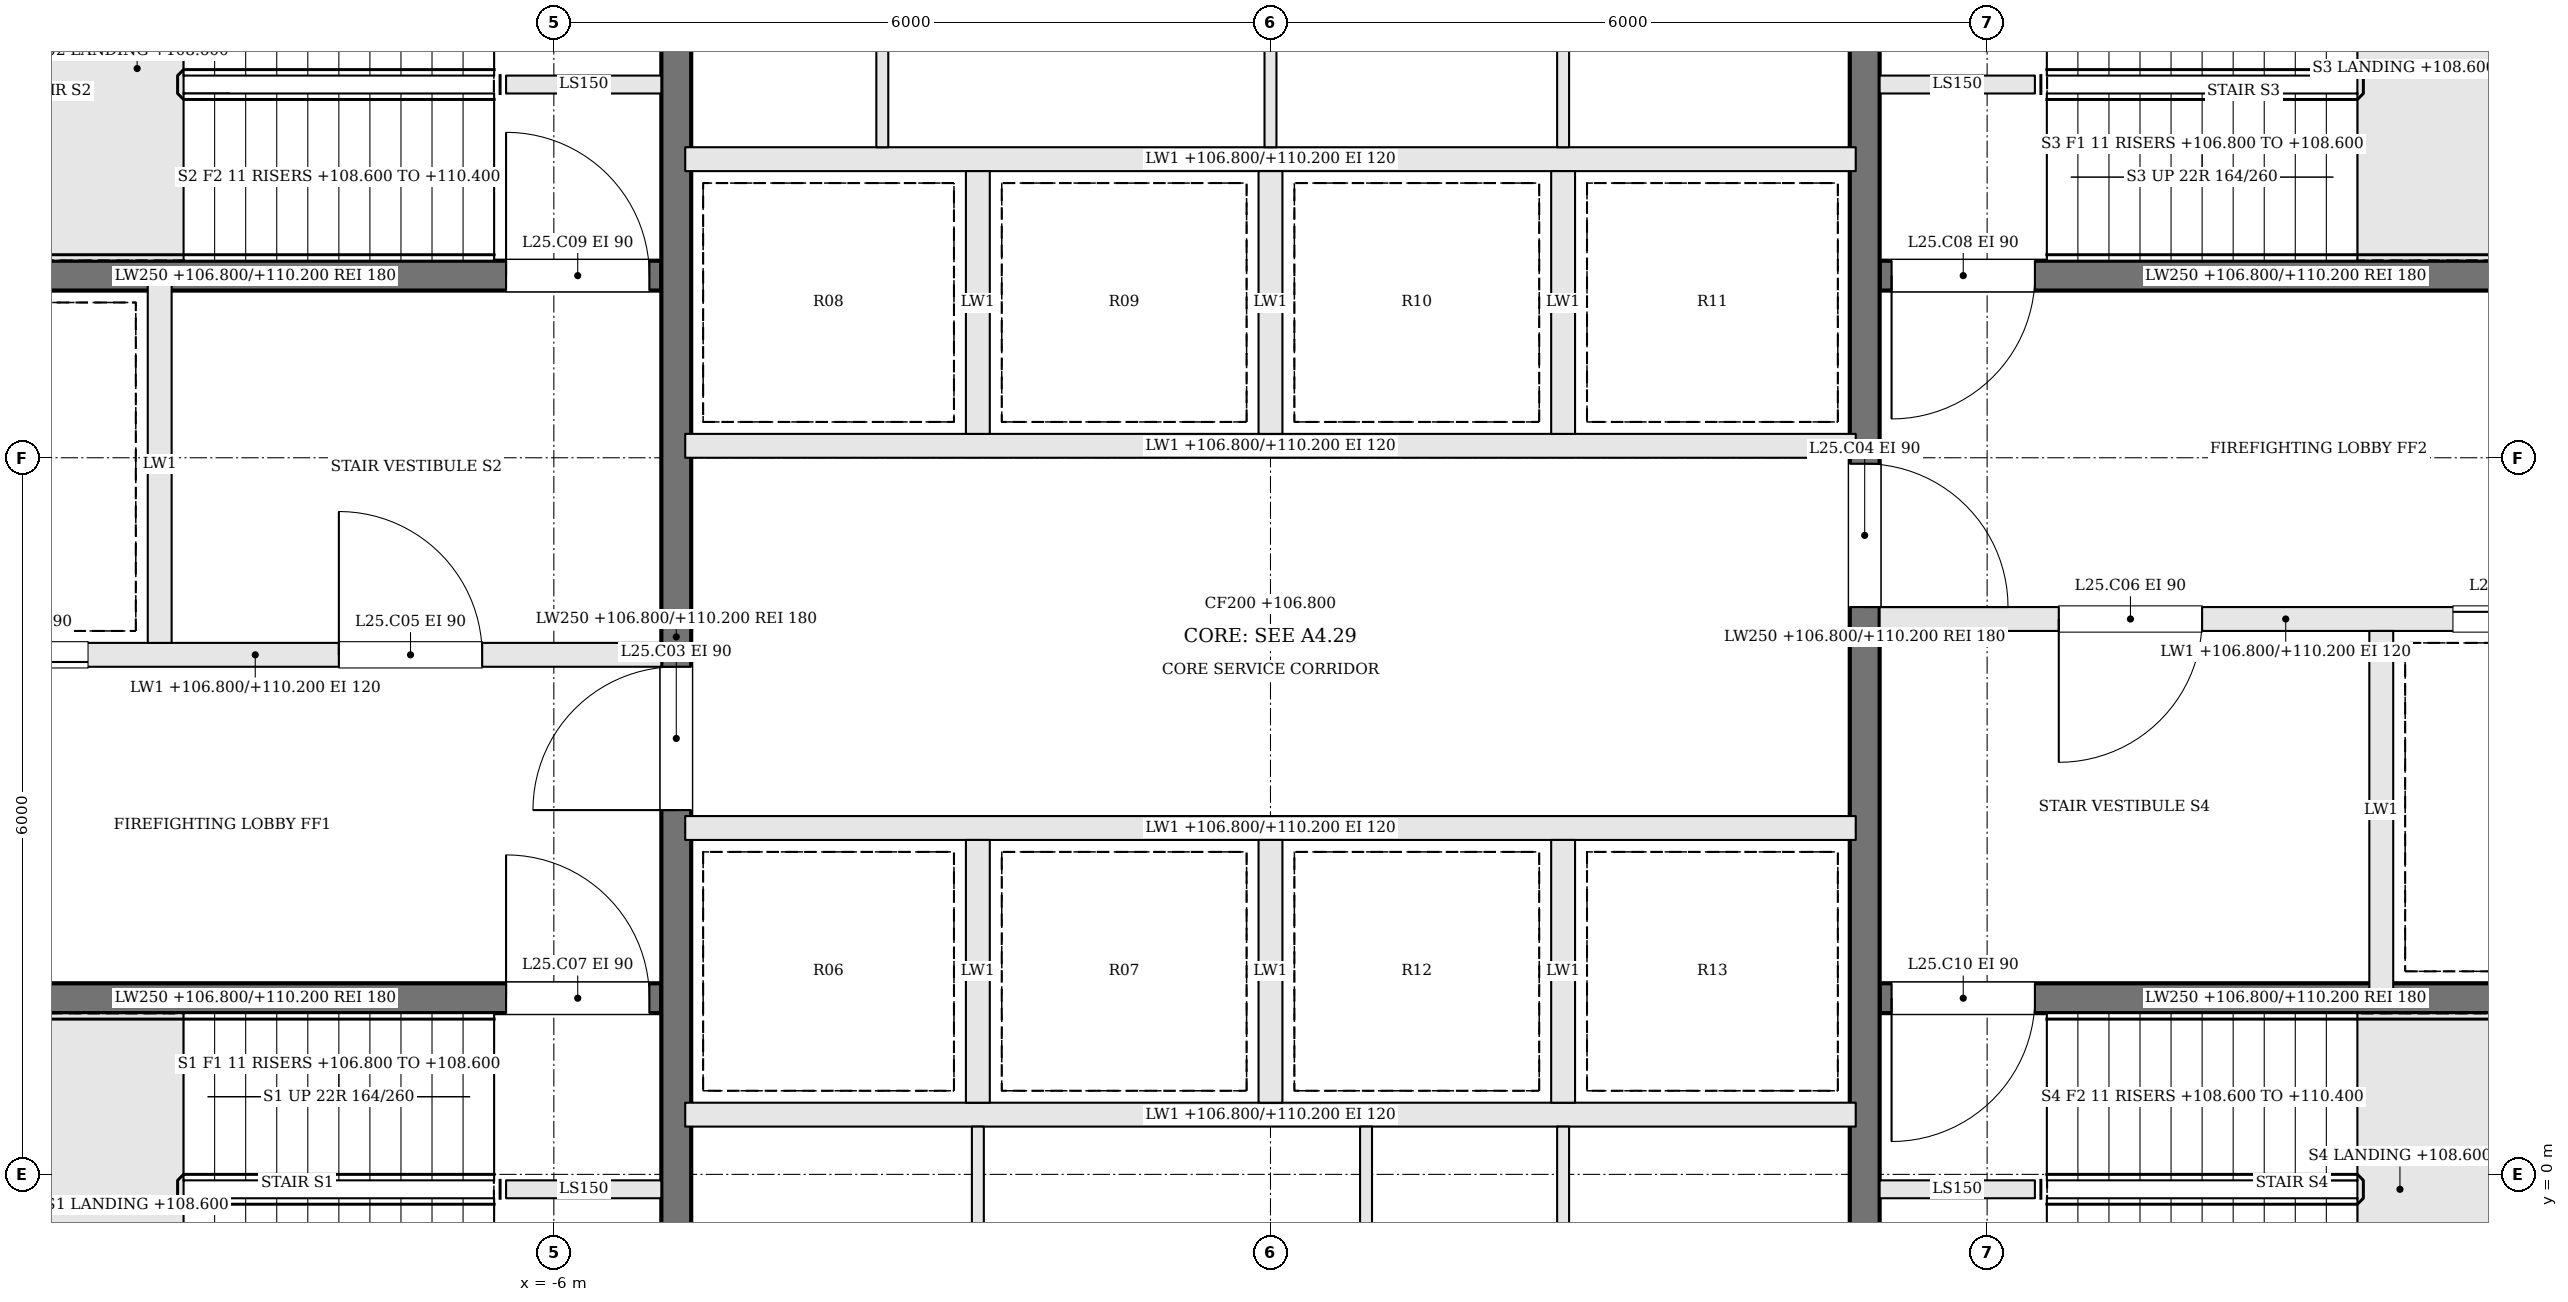
"""IFC4 building model, lengths in metres.
Left out: names, types, materials, properties, quantities, classifications, styles, units other than length and angle.
Written with IfcOpenShell. Run it as: python <this file> out.ifc"""

import sys

from ifc_helpers import new_model, si_unit, direction, frame, frame_2d, origin, place, context, subcontext, project, spatial, rectangle, extrude, element, fill, save


model = new_model("IFC4")
c1 = context("Model", 3, precision=1e-05, world=origin(), true_north=direction((0.0, 1.0)))
c2 = subcontext(c1, "Body", "Model", "MODEL_VIEW")
j1 = project(units=[si_unit("LENGTHUNIT", "METRE"), si_unit("PLANEANGLEUNIT", "RADIAN")], contexts=[c1])
p1 = place(None, origin())
s1 = spatial("IfcSite", under=j1, at=p1, CompositionType="ELEMENT")
p2 = place(p1, origin())
s2 = spatial("IfcBuilding", under=s1, at=p2, CompositionType="ELEMENT")
p3 = place(p2, frame((0.0, 0.0, 106.8)))
s3 = spatial("IfcBuildingStorey", under=s2, at=p3, CompositionType="ELEMENT", Elevation=106.8)
for number, where, z_axis, x_axis in (
    (1, (-6.4, -0.125, 0.0), (0.0, 0.0, 1.0), (1.0, 0.0, 0.0)),
    (2, (6.4, 9.125, 0.0), (0.0, 0.0, 1.0), (-1.0, 0.0, 0.0)),
    (3, (-6.4, 9.125, 0.0), (0.0, 0.0, 1.0), (1.0, 0.0, 0.0)),
    (4, (6.4, -0.125, 0.0), (0.0, 0.0, 1.0), (-1.0, 0.0, 0.0)),
):
    element("IfcWall", number, at=place(p3, frame(where, z_axis=z_axis, x_axis=x_axis)), inside=s3, PredefinedType="SOLIDWALL", context=c2, shape_type="SweptSolid", body=[
        extrude(rectangle(XDim=1.3, YDim=0.15, at=frame_2d((0.65, 0.0))), origin(), (0.0, 0.0, 1.0), 3.4),
    ])
p4 = place(p3, frame((-11.9, 1.475, 0.0), z_axis=(0.0, 0.0, 1.0), x_axis=(1.0, 0.0, 0.0)))
e5 = element("IfcWall", 5, at=p4, inside=s3, PredefinedType="SOLIDWALL", context=c2, shape_type="SweptSolid", body=[
    extrude(rectangle(XDim=6.8, YDim=0.25, at=frame_2d((3.4, 0.0))), origin(), (0.0, 0.0, 1.0), 3.4),
])
p5 = place(p4, frame((5.5, 0.0, 0.0)))
e6 = element("IfcOpeningElement", 6, at=p5, cuts=e5, PredefinedType="OPENING", context=c2, shape_type="SweptSolid", body=[
    extrude(rectangle(XDim=1.2, YDim=2.1, at=frame_2d((0.6, 1.05))), frame((0.0, 0.135, 0.0), z_axis=(0.0, -1.0, 0.0), x_axis=(1.0, 0.0, 0.0)), (0.0, 0.0, 1.0), 0.27),
])
p6 = place(p3, frame((11.9, 7.525, 0.0), z_axis=(0.0, 0.0, 1.0), x_axis=(-1.0, 0.0, 0.0)))
e7 = element("IfcWall", 7, at=p6, inside=s3, PredefinedType="SOLIDWALL", context=c2, shape_type="SweptSolid", body=[
    extrude(rectangle(XDim=6.8, YDim=0.25, at=frame_2d((3.4, 0.0))), origin(), (0.0, 0.0, 1.0), 3.4),
])
p7 = place(p6, frame((5.5, 0.0, 0.0)))
e8 = element("IfcOpeningElement", 8, at=p7, cuts=e7, PredefinedType="OPENING", context=c2, shape_type="SweptSolid", body=[
    extrude(rectangle(XDim=1.2, YDim=2.1, at=frame_2d((0.6, 1.05))), frame((0.0, 0.135, 0.0), z_axis=(0.0, -1.0, 0.0), x_axis=(1.0, 0.0, 0.0)), (0.0, 0.0, 1.0), 0.27),
])
p8 = place(p3, frame((-11.9, 4.35, 0.0), z_axis=(0.0, 0.0, 1.0), x_axis=(1.0, 0.0, 0.0)))
e9 = element("IfcWall", 9, at=p8, inside=s3, PredefinedType="SOLIDWALL", context=c2, shape_type="SweptSolid", body=[
    extrude(rectangle(XDim=6.8, YDim=0.2, at=frame_2d((3.4, 0.0))), origin(), (0.0, 0.0, 1.0), 3.4),
])
p9 = place(p8, frame((4.1, 0.0, 0.0)))
e10 = element("IfcOpeningElement", 10, at=p9, cuts=e9, PredefinedType="OPENING", context=c2, shape_type="SweptSolid", body=[
    extrude(rectangle(XDim=1.2, YDim=2.1, at=frame_2d((0.6, 1.05))), frame((0.0, 0.11, 0.0), z_axis=(0.0, -1.0, 0.0), x_axis=(1.0, 0.0, 0.0)), (0.0, 0.0, 1.0), 0.22),
])
p10 = place(p8, frame((0.8, 0.0, 0.0)))
e11 = element("IfcOpeningElement", 11, at=p10, cuts=e9, PredefinedType="OPENING", context=c2, shape_type="SweptSolid", body=[
    extrude(rectangle(XDim=1.2, YDim=2.1, at=frame_2d((0.6, 1.05))), frame((0.0, 0.11, 0.0), z_axis=(0.0, -1.0, 0.0), x_axis=(1.0, 0.0, 0.0)), (0.0, 0.0, 1.0), 0.22),
])
p11 = place(p3, frame((11.9, 4.65, 0.0), z_axis=(0.0, 0.0, 1.0), x_axis=(-1.0, 0.0, 0.0)))
e12 = element("IfcWall", 12, at=p11, inside=s3, PredefinedType="SOLIDWALL", context=c2, shape_type="SweptSolid", body=[
    extrude(rectangle(XDim=6.8, YDim=0.2, at=frame_2d((3.4, 0.0))), origin(), (0.0, 0.0, 1.0), 3.4),
])
p12 = place(p11, frame((4.1, 0.0, 0.0)))
e13 = element("IfcOpeningElement", 13, at=p12, cuts=e12, PredefinedType="OPENING", context=c2, shape_type="SweptSolid", body=[
    extrude(rectangle(XDim=1.2, YDim=2.1, at=frame_2d((0.6, 1.05))), frame((0.0, 0.11, 0.0), z_axis=(0.0, -1.0, 0.0), x_axis=(1.0, 0.0, 0.0)), (0.0, 0.0, 1.0), 0.22),
])
p13 = place(p11, frame((0.8, 0.0, 0.0)))
e14 = element("IfcOpeningElement", 14, at=p13, cuts=e12, PredefinedType="OPENING", context=c2, shape_type="SweptSolid", body=[
    extrude(rectangle(XDim=1.2, YDim=2.1, at=frame_2d((0.6, 1.05))), frame((0.0, 0.11, 0.0), z_axis=(0.0, -1.0, 0.0), x_axis=(1.0, 0.0, 0.0)), (0.0, 0.0, 1.0), 0.22),
])
p14 = place(p3, frame((-11.9, 7.525, 0.0), z_axis=(0.0, 0.0, 1.0), x_axis=(1.0, 0.0, 0.0)))
e15 = element("IfcWall", 15, at=p14, inside=s3, PredefinedType="SOLIDWALL", context=c2, shape_type="SweptSolid", body=[
    extrude(rectangle(XDim=6.8, YDim=0.25, at=frame_2d((3.4, 0.0))), origin(), (0.0, 0.0, 1.0), 3.4),
])
p15 = place(p14, frame((5.5, 0.0, 0.0)))
e16 = element("IfcOpeningElement", 16, at=p15, cuts=e15, PredefinedType="OPENING", context=c2, shape_type="SweptSolid", body=[
    extrude(rectangle(XDim=1.2, YDim=2.1, at=frame_2d((0.6, 1.05))), frame((0.0, 0.135, 0.0), z_axis=(0.0, -1.0, 0.0), x_axis=(1.0, 0.0, 0.0)), (0.0, 0.0, 1.0), 0.27),
])
p16 = place(p3, frame((11.9, 1.475, 0.0), z_axis=(0.0, 0.0, 1.0), x_axis=(-1.0, 0.0, 0.0)))
e17 = element("IfcWall", 17, at=p16, inside=s3, PredefinedType="SOLIDWALL", context=c2, shape_type="SweptSolid", body=[
    extrude(rectangle(XDim=6.8, YDim=0.25, at=frame_2d((3.4, 0.0))), origin(), (0.0, 0.0, 1.0), 3.4),
])
p17 = place(p16, frame((5.5, 0.0, 0.0)))
e18 = element("IfcOpeningElement", 18, at=p17, cuts=e17, PredefinedType="OPENING", context=c2, shape_type="SweptSolid", body=[
    extrude(rectangle(XDim=1.2, YDim=2.1, at=frame_2d((0.6, 1.05))), frame((0.0, 0.135, 0.0), z_axis=(0.0, -1.0, 0.0), x_axis=(1.0, 0.0, 0.0)), (0.0, 0.0, 1.0), 0.27),
])
for number, where, z_axis, x_axis in (
    (19, (-9.3, 4.45, 0.0), (0.0, 0.0, 1.0), (0.0, 1.0, 0.0)),
    (20, (9.3, 4.55, 0.0), (0.0, 0.0, 1.0), (0.0, -1.0, 0.0)),
):
    element("IfcWall", number, at=place(p3, frame(where, z_axis=z_axis, x_axis=x_axis)), inside=s3, PredefinedType="SOLIDWALL", context=c2, shape_type="SweptSolid", body=[
        extrude(rectangle(XDim=3.0, YDim=0.2, at=frame_2d((1.5, 0.0))), origin(), (0.0, 0.0, 1.0), 3.4),
    ])
p18 = place(p3, frame((-4.975, -1.9, 0.0), z_axis=(0.0, 0.0, 1.0), x_axis=(0.0, 1.0, 0.0)))
e21 = element("IfcWall", 21, at=p18, inside=s3, PredefinedType="SOLIDWALL", context=c2, shape_type="SweptSolid", body=[
    extrude(rectangle(XDim=12.8, YDim=0.25, at=frame_2d((6.4, 0.0))), origin(), (0.0, 0.0, 1.0), 3.4),
])
p19 = place(p18, frame((4.95, 0.0, 0.0)))
e22 = element("IfcOpeningElement", 22, at=p19, cuts=e21, PredefinedType="OPENING", context=c2, shape_type="SweptSolid", body=[
    extrude(rectangle(XDim=1.2, YDim=2.1, at=frame_2d((0.6, 1.05))), frame((0.0, 0.135, 0.0), z_axis=(0.0, -1.0, 0.0), x_axis=(1.0, 0.0, 0.0)), (0.0, 0.0, 1.0), 0.27),
])
p20 = place(p3, frame((4.975, 10.9, 0.0), z_axis=(0.0, 0.0, 1.0), x_axis=(0.0, -1.0, 0.0)))
e23 = element("IfcWall", 23, at=p20, inside=s3, PredefinedType="SOLIDWALL", context=c2, shape_type="SweptSolid", body=[
    extrude(rectangle(XDim=12.8, YDim=0.25, at=frame_2d((6.4, 0.0))), origin(), (0.0, 0.0, 1.0), 3.4),
])
p21 = place(p20, frame((4.95, 0.0, 0.0)))
e24 = element("IfcOpeningElement", 24, at=p21, cuts=e23, PredefinedType="OPENING", context=c2, shape_type="SweptSolid", body=[
    extrude(rectangle(XDim=1.2, YDim=2.1, at=frame_2d((0.6, 1.05))), frame((0.0, 0.135, 0.0), z_axis=(0.0, -1.0, 0.0), x_axis=(1.0, 0.0, 0.0)), (0.0, 0.0, 1.0), 0.27),
])
for number, where, z_axis, x_axis in (
    (25, (-4.9, 0.5, 0.0), (0.0, 0.0, 1.0), (1.0, 0.0, 0.0)),
    (26, (-4.9, 2.9, 0.0), (0.0, 0.0, 1.0), (1.0, 0.0, 0.0)),
    (27, (-4.9, 6.1, 0.0), (0.0, 0.0, 1.0), (1.0, 0.0, 0.0)),
    (28, (-4.9, 8.5, 0.0), (0.0, 0.0, 1.0), (1.0, 0.0, 0.0)),
):
    element("IfcWall", number, at=place(p3, frame(where, z_axis=z_axis, x_axis=x_axis)), inside=s3, PredefinedType="SOLIDWALL", context=c2, shape_type="SweptSolid", body=[
        extrude(rectangle(XDim=9.8, YDim=0.2, at=frame_2d((4.9, 0.0))), origin(), (0.0, 0.0, 1.0), 3.4),
    ])
for number, where, z_axis, x_axis in (
    (29, (-2.45, 0.6, 0.0), (0.0, 0.0, 1.0), (0.0, 1.0, 0.0)),
    (30, (0.0, 0.6, 0.0), (0.0, 0.0, 1.0), (0.0, 1.0, 0.0)),
    (31, (2.45, 0.6, 0.0), (0.0, 0.0, 1.0), (0.0, 1.0, 0.0)),
    (32, (-2.45, 6.2, 0.0), (0.0, 0.0, 1.0), (0.0, 1.0, 0.0)),
    (33, (0.0, 6.2, 0.0), (0.0, 0.0, 1.0), (0.0, 1.0, 0.0)),
    (34, (2.45, 6.2, 0.0), (0.0, 0.0, 1.0), (0.0, 1.0, 0.0)),
):
    element("IfcWall", number, at=place(p3, frame(where, z_axis=z_axis, x_axis=x_axis)), inside=s3, PredefinedType="SOLIDWALL", context=c2, shape_type="SweptSolid", body=[
        extrude(rectangle(XDim=2.2, YDim=0.2, at=frame_2d((1.1, 0.0))), origin(), (0.0, 0.0, 1.0), 3.4),
    ])
for number, where, z_axis, x_axis in (
    (35, (-2.45, -1.9, 0.0), (0.0, 0.0, 1.0), (0.0, 1.0, 0.0)),
    (36, (0.8, -1.9, 0.0), (0.0, 0.0, 1.0), (0.0, 1.0, 0.0)),
    (37, (2.45, -1.9, 0.0), (0.0, 0.0, 1.0), (0.0, 1.0, 0.0)),
    (38, (-3.25, 8.6, 0.0), (0.0, 0.0, 1.0), (0.0, 1.0, 0.0)),
    (39, (0.0, 8.6, 0.0), (0.0, 0.0, 1.0), (0.0, 1.0, 0.0)),
    (40, (2.45, 8.6, 0.0), (0.0, 0.0, 1.0), (0.0, 1.0, 0.0)),
):
    element("IfcWall", number, at=place(p3, frame(where, z_axis=z_axis, x_axis=x_axis)), inside=s3, PredefinedType="PARTITIONING", context=c2, shape_type="SweptSolid", body=[
        extrude(rectangle(XDim=2.3, YDim=0.1, at=frame_2d((1.15, 0.0))), origin(), (0.0, 0.0, 1.0), 3.4),
    ])
p22 = place(p19, origin())
e41 = element("IfcDoor", 41, at=p22, inside=s3, OperationType="SINGLE_SWING_LEFT", PredefinedType="DOOR", context=c2, shape_type="SweptSolid", body=[
    extrude(rectangle(XDim=1.2, YDim=2.1, at=frame_2d((0.6, 1.05))), frame((0.0, 0.025, 0.0), z_axis=(0.0, -1.0, 0.0), x_axis=(1.0, 0.0, 0.0)), (0.0, 0.0, 1.0), 0.05),
])
fill(e22, e41)
p23 = place(p21, origin())
e42 = element("IfcDoor", 42, at=p23, inside=s3, OperationType="SINGLE_SWING_RIGHT", PredefinedType="DOOR", context=c2, shape_type="SweptSolid", body=[
    extrude(rectangle(XDim=1.2, YDim=2.1, at=frame_2d((0.6, 1.05))), frame((0.0, 0.025, 0.0), z_axis=(0.0, -1.0, 0.0), x_axis=(1.0, 0.0, 0.0)), (0.0, 0.0, 1.0), 0.05),
])
fill(e24, e42)
p24 = place(p9, origin())
e43 = element("IfcDoor", 43, at=p24, inside=s3, OperationType="SINGLE_SWING_LEFT", PredefinedType="DOOR", context=c2, shape_type="SweptSolid", body=[
    extrude(rectangle(XDim=1.2, YDim=2.1, at=frame_2d((0.6, 1.05))), frame((0.0, 0.025, 0.0), z_axis=(0.0, -1.0, 0.0), x_axis=(1.0, 0.0, 0.0)), (0.0, 0.0, 1.0), 0.05),
])
fill(e10, e43)
p25 = place(p12, origin())
e44 = element("IfcDoor", 44, at=p25, inside=s3, OperationType="SINGLE_SWING_RIGHT", PredefinedType="DOOR", context=c2, shape_type="SweptSolid", body=[
    extrude(rectangle(XDim=1.2, YDim=2.1, at=frame_2d((0.6, 1.05))), frame((0.0, 0.025, 0.0), z_axis=(0.0, -1.0, 0.0), x_axis=(1.0, 0.0, 0.0)), (0.0, 0.0, 1.0), 0.05),
])
fill(e13, e44)
p26 = place(p5, origin())
e45 = element("IfcDoor", 45, at=p26, inside=s3, OperationType="SINGLE_SWING_LEFT", PredefinedType="DOOR", context=c2, shape_type="SweptSolid", body=[
    extrude(rectangle(XDim=1.2, YDim=2.1, at=frame_2d((0.6, 1.05))), frame((0.0, 0.025, 0.0), z_axis=(0.0, -1.0, 0.0), x_axis=(1.0, 0.0, 0.0)), (0.0, 0.0, 1.0), 0.05),
])
fill(e6, e45)
p27 = place(p7, origin())
e46 = element("IfcDoor", 46, at=p27, inside=s3, OperationType="SINGLE_SWING_RIGHT", PredefinedType="DOOR", context=c2, shape_type="SweptSolid", body=[
    extrude(rectangle(XDim=1.2, YDim=2.1, at=frame_2d((0.6, 1.05))), frame((0.0, 0.025, 0.0), z_axis=(0.0, -1.0, 0.0), x_axis=(1.0, 0.0, 0.0)), (0.0, 0.0, 1.0), 0.05),
])
fill(e8, e46)
p28 = place(p15, origin())
e47 = element("IfcDoor", 47, at=p28, inside=s3, OperationType="SINGLE_SWING_LEFT", PredefinedType="DOOR", context=c2, shape_type="SweptSolid", body=[
    extrude(rectangle(XDim=1.2, YDim=2.1, at=frame_2d((0.6, 1.05))), frame((0.0, 0.025, 0.0), z_axis=(0.0, -1.0, 0.0), x_axis=(1.0, 0.0, 0.0)), (0.0, 0.0, 1.0), 0.05),
])
fill(e16, e47)
p29 = place(p17, origin())
e48 = element("IfcDoor", 48, at=p29, inside=s3, OperationType="SINGLE_SWING_RIGHT", PredefinedType="DOOR", context=c2, shape_type="SweptSolid", body=[
    extrude(rectangle(XDim=1.2, YDim=2.1, at=frame_2d((0.6, 1.05))), frame((0.0, 0.025, 0.0), z_axis=(0.0, -1.0, 0.0), x_axis=(1.0, 0.0, 0.0)), (0.0, 0.0, 1.0), 0.05),
])
fill(e18, e48)
p30 = place(p10, origin())
e49 = element("IfcDoor", 49, at=p30, inside=s3, OperationType="SLIDING_TO_RIGHT", PredefinedType="DOOR", context=c2, shape_type="SweptSolid", body=[
    extrude(rectangle(XDim=1.2, YDim=2.1, at=frame_2d((0.6, 1.05))), frame((0.0, 0.025, 0.0), z_axis=(0.0, -1.0, 0.0), x_axis=(1.0, 0.0, 0.0)), (0.0, 0.0, 1.0), 0.05),
])
fill(e11, e49)
p31 = place(p13, origin())
e50 = element("IfcDoor", 50, at=p31, inside=s3, OperationType="SLIDING_TO_RIGHT", PredefinedType="DOOR", context=c2, shape_type="SweptSolid", body=[
    extrude(rectangle(XDim=1.2, YDim=2.1, at=frame_2d((0.6, 1.05))), frame((0.0, 0.025, 0.0), z_axis=(0.0, -1.0, 0.0), x_axis=(1.0, 0.0, 0.0)), (0.0, 0.0, 1.0), 0.05),
])
fill(e14, e50)
save(model, sys.argv[1])
